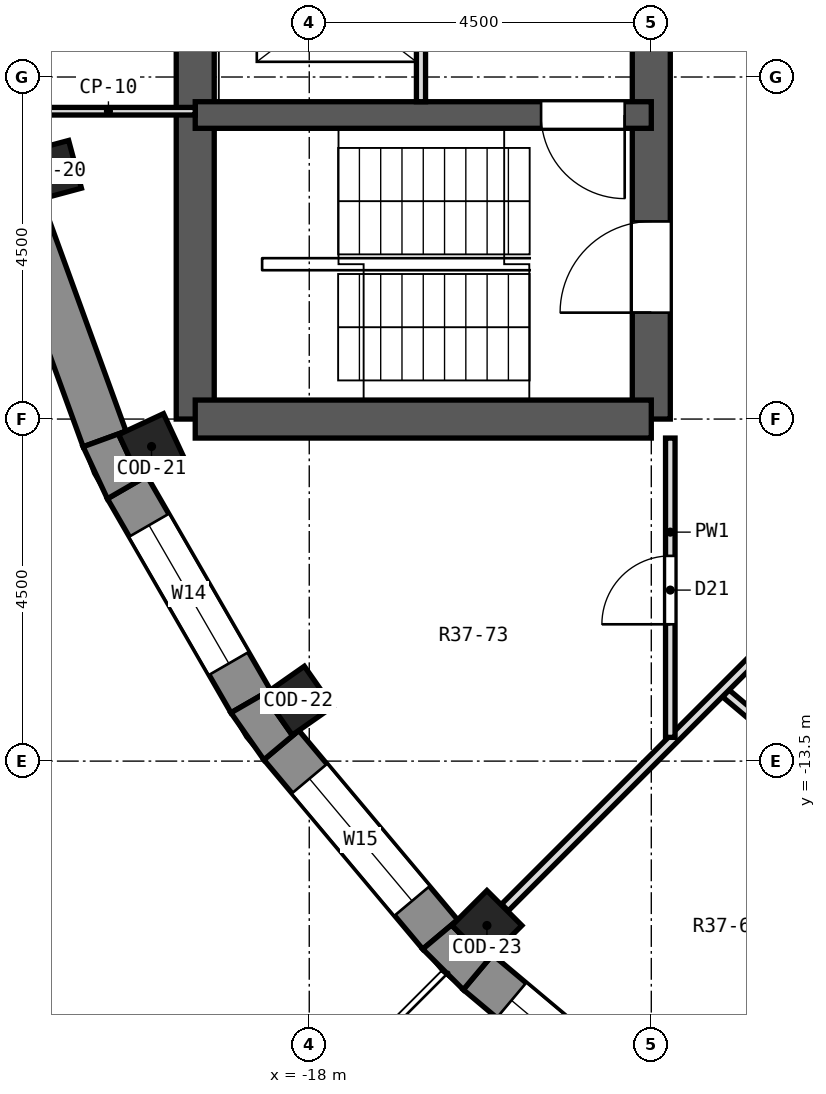
"""IFC4 building model, lengths in metres.
Left out: names, types, materials, properties, quantities, classifications, styles, units other than length and angle.
Written with IfcOpenShell. Run it as: python <this file> out.ifc"""

import sys

from ifc_helpers import new_model, si_unit, direction, frame, frame_2d, origin, origin_2d, place, context, subcontext, project, spatial, polyline, rectangle, outline, extrude, element, fill, save


model = new_model("IFC4")
c1 = context("Model", 3, precision=1e-05, world=origin(), true_north=direction((0.0, 1.0)))
c2 = subcontext(c1, "Body", "Model", "MODEL_VIEW")
j1 = project(units=[si_unit("LENGTHUNIT", "METRE"), si_unit("PLANEANGLEUNIT", "RADIAN")], contexts=[c1])
p1 = place(None, origin())
s1 = spatial("IfcSite", under=j1, at=p1, CompositionType="ELEMENT")
p2 = place(p1, origin())
s2 = spatial("IfcBuilding", under=s1, at=p2, CompositionType="ELEMENT")
p3 = place(p2, frame((0.0, 0.0, 269.3)))
s3 = spatial("IfcBuildingStorey", under=s2, at=p3, CompositionType="ELEMENT", Elevation=269.3)
for number, where, z_axis, x_axis in (
    (1, (-21.395, -5.733, 0.0), (0.0, 0.0, 1.0), (-0.966, -0.259, 0.0)),
    (2, (-20.075, -9.361, 0.0), (0.0, 0.0, 1.0), (-0.906, -0.423, 0.0)),
    (3, (-18.144, -12.705, 0.0), (0.0, 0.0, 1.0), (-0.819, -0.574, 0.0)),
    (4, (-15.662, -15.662, 0.0), (0.0, 0.0, 1.0), (-0.707, -0.707, 0.0)),
):
    element("IfcColumn", number, at=place(p3, frame(where, z_axis=z_axis, x_axis=x_axis)), inside=s3, PredefinedType="COLUMN", context=c2, shape_type="SweptSolid", body=[
        extrude(rectangle(XDim=0.65, YDim=0.65, at=origin_2d()), origin(), (0.0, 0.0, 1.0), 3.3),
    ])
p4 = place(p3, frame((-13.5, -9.0, 0.0), z_axis=(0.0, 0.0, 1.0), x_axis=(0.0, 1.0, 0.0)))
e5 = element("IfcWall", 5, at=p4, inside=s3, PredefinedType="SHEAR", context=c2, shape_type="SweptSolid", body=[
    extrude(rectangle(XDim=18.0, YDim=0.5, at=frame_2d((9.0, 0.0))), origin(), (0.0, 0.0, 1.0), 3.3),
])
p5 = place(p4, frame((15.4, 0.0, 0.0)))
e6 = element("IfcOpeningElement", 6, at=p5, cuts=e5, PredefinedType="OPENING", context=c2, shape_type="SweptSolid", body=[
    extrude(rectangle(XDim=1.2, YDim=2.1, at=frame_2d((0.6, 1.05))), frame((0.0, 0.262, 0.0), z_axis=(0.0, -1.0, 0.0), x_axis=(1.0, 0.0, 0.0)), (0.0, 0.0, 1.0), 0.524),
])
p6 = place(p4, frame((1.4, 0.0, 0.0)))
e7 = element("IfcOpeningElement", 7, at=p6, cuts=e5, PredefinedType="OPENING", context=c2, shape_type="SweptSolid", body=[
    extrude(rectangle(XDim=1.2, YDim=2.1, at=frame_2d((0.6, 1.05))), frame((0.0, 0.262, 0.0), z_axis=(0.0, -1.0, 0.0), x_axis=(1.0, 0.0, 0.0)), (0.0, 0.0, 1.0), 0.524),
])
p7 = place(p4, frame((7.5, 0.0, 0.0)))
e8 = element("IfcOpeningElement", 8, at=p7, cuts=e5, PredefinedType="OPENING", context=c2, shape_type="SweptSolid", body=[
    extrude(rectangle(XDim=3.0, YDim=2.4, at=frame_2d((1.5, 1.2))), frame((0.0, 0.262, 0.0), z_axis=(0.0, -1.0, 0.0), x_axis=(1.0, 0.0, 0.0)), (0.0, 0.0, 1.0), 0.524),
])
p8 = place(p3, frame((-19.5, -9.0, 0.0), z_axis=(0.0, 0.0, 1.0), x_axis=(0.0, 1.0, 0.0)))
e9 = element("IfcWall", 9, at=p8, inside=s3, PredefinedType="SHEAR", context=c2, shape_type="SweptSolid", body=[
    extrude(rectangle(XDim=18.0, YDim=0.5, at=frame_2d((9.0, 0.0))), origin(), (0.0, 0.0, 1.0), 3.3),
])
p9 = place(p8, frame((9.45, 0.0, 0.0)))
e10 = element("IfcOpeningElement", 10, at=p9, cuts=e9, PredefinedType="OPENING", context=c2, shape_type="SweptSolid", body=[
    extrude(rectangle(XDim=0.9, YDim=2.1, at=frame_2d((0.45, 1.05))), frame((0.0, 0.262, 0.0), z_axis=(0.0, -1.0, 0.0), x_axis=(1.0, 0.0, 0.0)), (0.0, 0.0, 1.0), 0.524),
])
p10 = place(p8, frame((7.65, 0.0, 0.0)))
e11 = element("IfcOpeningElement", 11, at=p10, cuts=e9, PredefinedType="OPENING", context=c2, shape_type="SweptSolid", body=[
    extrude(rectangle(XDim=0.9, YDim=2.1, at=frame_2d((0.45, 1.05))), frame((0.0, 0.262, 0.0), z_axis=(0.0, -1.0, 0.0), x_axis=(1.0, 0.0, 0.0)), (0.0, 0.0, 1.0), 0.524),
])
p11 = place(p3, frame((-13.5, -9.0, 0.0), z_axis=(0.0, 0.0, 1.0), x_axis=(-1.0, 0.0, 0.0)))
e12 = element("IfcWall", 12, at=p11, inside=s3, PredefinedType="SHEAR", context=c2, shape_type="SweptSolid", body=[
    extrude(rectangle(XDim=6.0, YDim=0.5, at=frame_2d((3.0, 0.0))), origin(), (0.0, 0.0, 1.0), 3.3),
])
p12 = place(p3, frame((-13.5, -5.0, 0.0), z_axis=(0.0, 0.0, 1.0), x_axis=(-1.0, 0.0, 0.0)))
e13 = element("IfcWall", 13, at=p12, inside=s3, PredefinedType="SHEAR", context=c2, shape_type="SweptSolid", body=[
    extrude(rectangle(XDim=6.0, YDim=0.35, at=frame_2d((3.0, 0.0))), origin(), (0.0, 0.0, 1.0), 3.3),
])
p13 = place(p12, frame((0.35, 0.0, 0.0)))
e14 = element("IfcOpeningElement", 14, at=p13, cuts=e13, PredefinedType="OPENING", context=c2, shape_type="SweptSolid", body=[
    extrude(rectangle(XDim=1.1, YDim=2.1, at=frame_2d((0.55, 1.05))), frame((0.0, 0.187, 0.0), z_axis=(0.0, -1.0, 0.0), x_axis=(1.0, 0.0, 0.0)), (0.0, 0.0, 1.0), 0.374),
])
p14 = place(p3, frame((-21.805, -6.206, 0.0), z_axis=(0.0, 0.0, 1.0), x_axis=(0.342056509473, -0.939679383794, 0.0)))
e15 = element("IfcWall", 15, at=p14, inside=s3, PredefinedType="SOLIDWALL", context=c2, shape_type="SweptSolid", body=[
    extrude(rectangle(XDim=3.252, YDim=0.6, at=frame_2d((1.626, 0.0))), origin(), (0.0, 0.0, 1.0), 2.9),
])
p15 = place(p3, frame((-20.396, -9.898, 0.0), z_axis=(0.0, 0.0, 1.0), x_axis=(0.500014901547, -0.866016800201, 0.0)))
e16 = element("IfcWall", 16, at=p15, inside=s3, PredefinedType="SOLIDWALL", context=c2, shape_type="SweptSolid", body=[
    extrude(rectangle(XDim=3.252, YDim=0.6, at=frame_2d((1.626, 0.0))), origin(), (0.0, 0.0, 1.0), 2.9),
])
p16 = place(p15, frame((0.576, 0.0, 0.9)))
e17 = element("IfcOpeningElement", 17, at=p16, cuts=e16, PredefinedType="OPENING", context=c2, shape_type="SweptSolid", body=[
    extrude(rectangle(XDim=2.1, YDim=1.8, at=frame_2d((1.05, 0.9))), frame((0.0, 0.312, 0.0), z_axis=(0.0, -1.0, 0.0), x_axis=(1.0, 0.0, 0.0)), (0.0, 0.0, 1.0), 0.624),
])
p17 = place(p3, frame((-18.367, -13.29, 0.0), z_axis=(0.0, 0.0, 1.0), x_axis=(0.64277291405, -0.766056773982, 0.0)))
e18 = element("IfcWall", 18, at=p17, inside=s3, PredefinedType="SOLIDWALL", context=c2, shape_type="SweptSolid", body=[
    extrude(rectangle(XDim=3.252, YDim=0.6, at=frame_2d((1.626, 0.0))), origin(), (0.0, 0.0, 1.0), 2.9),
])
p18 = place(p17, frame((0.576, 0.0, 0.9)))
e19 = element("IfcOpeningElement", 19, at=p18, cuts=e18, PredefinedType="OPENING", context=c2, shape_type="SweptSolid", body=[
    extrude(rectangle(XDim=2.1, YDim=1.8, at=frame_2d((1.05, 0.9))), frame((0.0, 0.312, 0.0), z_axis=(0.0, -1.0, 0.0), x_axis=(1.0, 0.0, 0.0)), (0.0, 0.0, 1.0), 0.624),
])
p19 = place(p3, frame((-15.781, -16.277, 0.0), z_axis=(0.0, 0.0, 1.0), x_axis=(0.766056773982, -0.64277291405, 0.0)))
e20 = element("IfcWall", 20, at=p19, inside=s3, PredefinedType="SOLIDWALL", context=c2, shape_type="SweptSolid", body=[
    extrude(rectangle(XDim=3.252, YDim=0.6, at=frame_2d((1.626, 0.0))), origin(), (0.0, 0.0, 1.0), 2.9),
])
p20 = place(p19, frame((0.576, 0.0, 0.9)))
e21 = element("IfcOpeningElement", 21, at=p20, cuts=e20, PredefinedType="OPENING", context=c2, shape_type="SweptSolid", body=[
    extrude(rectangle(XDim=2.1, YDim=1.8, at=frame_2d((1.05, 0.9))), frame((0.0, 0.312, 0.0), z_axis=(0.0, -1.0, 0.0), x_axis=(1.0, 0.0, 0.0)), (0.0, 0.0, 1.0), 0.624),
])
p21 = place(p3, origin())
e22 = element("IfcWall", 22, at=p21, inside=s3, PredefinedType="SOLIDWALL", context=c2, shape_type="SweptSolid", body=[
    extrude(outline(polyline([(-20.975, -9.364), (-20.656, -10.048), (-20.136, -9.748), (-20.232, -9.793), (-20.507, -9.204), (-20.411, -9.159), (-20.975, -9.364)])), origin(), (0.0, 0.0, 1.0), 2.9),
])
p22 = place(p3, origin())
e23 = element("IfcWall", 23, at=p22, inside=s3, PredefinedType="SOLIDWALL", context=c2, shape_type="SweptSolid", body=[
    extrude(outline(polyline([(-19.03, -12.864), (-18.597, -13.482), (-18.137, -13.097), (-18.224, -13.157), (-18.597, -12.625), (-18.51, -12.564), (-19.03, -12.864)])), origin(), (0.0, 0.0, 1.0), 2.9),
])
p23 = place(p3, origin())
e24 = element("IfcWall", 24, at=p23, inside=s3, PredefinedType="SOLIDWALL", context=c2, shape_type="SweptSolid", body=[
    extrude(outline(polyline([(-15.973, -16.507), (-15.588, -16.047), (-15.662, -16.122), (-16.122, -15.662), (-16.047, -15.588), (-16.507, -15.973), (-15.973, -16.507)])), origin(), (0.0, 0.0, 1.0), 2.9),
])
p24 = place(p3, frame((-12.521, -12.608, 0.0), z_axis=(0.0, 0.0, 1.0), x_axis=(0.764770295867, -0.644303030071, 0.0)))
e25 = element("IfcWall", 25, at=p24, inside=s3, PredefinedType="PARTITIONING", context=c2, shape_type="SweptSolid", body=[
    extrude(rectangle(XDim=3.101, YDim=0.125, at=frame_2d((1.55, 0.0))), origin(), (0.0, 0.0, 1.0), 2.9),
])
p25 = place(p24, frame((1.036, 0.0, 0.0)))
e26 = element("IfcOpeningElement", 26, at=p25, cuts=e25, PredefinedType="OPENING", context=c2, shape_type="SweptSolid", body=[
    extrude(rectangle(XDim=0.9, YDim=2.1, at=frame_2d((0.45, 1.05))), frame((0.0, 0.074, 0.0), z_axis=(0.0, -1.0, 0.0), x_axis=(1.0, 0.0, 0.0)), (0.0, 0.0, 1.0), 0.149),
])
p26 = place(p3, frame((-15.426, -15.426, 0.0), z_axis=(0.0, 0.0, 1.0), x_axis=(0.707106781187, 0.707106781187, 0.0)))
e27 = element("IfcWall", 27, at=p26, inside=s3, PredefinedType="PARTITIONING", context=c2, shape_type="SweptSolid", body=[
    extrude(rectangle(XDim=7.248, YDim=0.125, at=frame_2d((3.624, 0.0))), origin(), (0.0, 0.0, 1.0), 2.9),
])
p27 = place(p3, frame((-13.25, -13.188, 0.0), z_axis=(0.0, 0.0, 1.0), x_axis=(0.0, 1.0, 0.0)))
e28 = element("IfcWall", 28, at=p27, inside=s3, PredefinedType="PARTITIONING", context=c2, shape_type="SweptSolid", body=[
    extrude(rectangle(XDim=3.938, YDim=0.125, at=frame_2d((1.969, 0.0))), origin(), (0.0, 0.0, 1.0), 2.9),
])
p28 = place(p27, frame((1.488, 0.0, 0.0)))
e29 = element("IfcOpeningElement", 29, at=p28, cuts=e28, PredefinedType="OPENING", context=c2, shape_type="SweptSolid", body=[
    extrude(rectangle(XDim=0.9, YDim=2.1, at=frame_2d((0.45, 1.05))), frame((0.0, 0.074, 0.0), z_axis=(0.0, -1.0, 0.0), x_axis=(1.0, 0.0, 0.0)), (0.0, 0.0, 1.0), 0.149),
])
p29 = place(p3, frame((-19.5, -4.95, 0.0), z_axis=(0.0, 0.0, 1.0), x_axis=(-1.0, 0.0, 0.0)))
e30 = element("IfcWall", 30, at=p29, inside=s3, PredefinedType="PARTITIONING", context=c2, shape_type="SweptSolid", body=[
    extrude(rectangle(XDim=2.284, YDim=0.1, at=frame_2d((1.142, 0.0))), origin(), (0.0, 0.0, 1.0), 2.9),
])
p30 = place(p3, frame((-16.53, -4.825, 0.0), z_axis=(0.0, 0.0, 1.0), x_axis=(0.0, 1.0, 0.0)))
e31 = element("IfcWall", 31, at=p30, inside=s3, PredefinedType="PARTITIONING", context=c2, shape_type="SweptSolid", body=[
    extrude(rectangle(XDim=2.65, YDim=0.12, at=frame_2d((1.325, 0.0))), origin(), (0.0, 0.0, 1.0), 2.9),
])
p31 = place(p30, frame((0.775, 0.0, 0.0)))
e32 = element("IfcOpeningElement", 32, at=p31, cuts=e31, PredefinedType="OPENING", context=c2, shape_type="SweptSolid", body=[
    extrude(rectangle(XDim=1.1, YDim=2.1, at=frame_2d((0.55, 1.05))), frame((0.0, 0.072, 0.0), z_axis=(0.0, -1.0, 0.0), x_axis=(1.0, 0.0, 0.0)), (0.0, 0.0, 1.0), 0.144),
])
p32 = place(p16, origin())
e33 = element("IfcWindow", 33, at=p32, inside=s3, PartitioningType="SINGLE_PANEL", PredefinedType="WINDOW", context=c2, shape_type="SweptSolid", body=[
    extrude(rectangle(XDim=2.1, YDim=1.8, at=frame_2d((1.05, 0.9))), frame((0.0, 0.18, 0.0), z_axis=(0.0, -1.0, 0.0), x_axis=(1.0, 0.0, 0.0)), (0.0, 0.0, 1.0), 0.06),
])
fill(e17, e33)
p33 = place(p18, origin())
e34 = element("IfcWindow", 34, at=p33, inside=s3, PartitioningType="SINGLE_PANEL", PredefinedType="WINDOW", context=c2, shape_type="SweptSolid", body=[
    extrude(rectangle(XDim=2.1, YDim=1.8, at=frame_2d((1.05, 0.9))), frame((0.0, 0.18, 0.0), z_axis=(0.0, -1.0, 0.0), x_axis=(1.0, 0.0, 0.0)), (0.0, 0.0, 1.0), 0.06),
])
fill(e19, e34)
p34 = place(p20, origin())
e35 = element("IfcWindow", 35, at=p34, inside=s3, PartitioningType="SINGLE_PANEL", PredefinedType="WINDOW", context=c2, shape_type="SweptSolid", body=[
    extrude(rectangle(XDim=2.1, YDim=1.8, at=frame_2d((1.05, 0.9))), frame((0.0, 0.18, 0.0), z_axis=(0.0, -1.0, 0.0), x_axis=(1.0, 0.0, 0.0)), (0.0, 0.0, 1.0), 0.06),
])
fill(e21, e35)
p35 = place(p28, origin())
e36 = element("IfcDoor", 36, at=p35, inside=s3, OperationType="SINGLE_SWING_LEFT", PredefinedType="DOOR", context=c2, shape_type="SweptSolid", body=[
    extrude(rectangle(XDim=0.9, YDim=2.1, at=frame_2d((0.45, 1.05))), frame((0.0, 0.025, 0.0), z_axis=(0.0, -1.0, 0.0), x_axis=(1.0, 0.0, 0.0)), (0.0, 0.0, 1.0), 0.05),
])
fill(e29, e36)
p36 = place(p13, origin())
e37 = element("IfcDoor", 37, at=p36, inside=s3, OperationType="SINGLE_SWING_LEFT", PredefinedType="DOOR", context=c2, shape_type="SweptSolid", body=[
    extrude(rectangle(XDim=1.1, YDim=2.1, at=frame_2d((0.55, 1.05))), frame((0.0, 0.025, 0.0), z_axis=(0.0, -1.0, 0.0), x_axis=(1.0, 0.0, 0.0)), (0.0, 0.0, 1.0), 0.05),
])
fill(e14, e37)
p37 = place(p6, origin())
e38 = element("IfcDoor", 38, at=p37, inside=s3, OperationType="SINGLE_SWING_LEFT", PredefinedType="DOOR", context=c2, shape_type="SweptSolid", body=[
    extrude(rectangle(XDim=1.2, YDim=2.1, at=frame_2d((0.6, 1.05))), frame((0.0, 0.025, 0.0), z_axis=(0.0, -1.0, 0.0), x_axis=(1.0, 0.0, 0.0)), (0.0, 0.0, 1.0), 0.05),
])
fill(e7, e38)
save(model, sys.argv[1])
